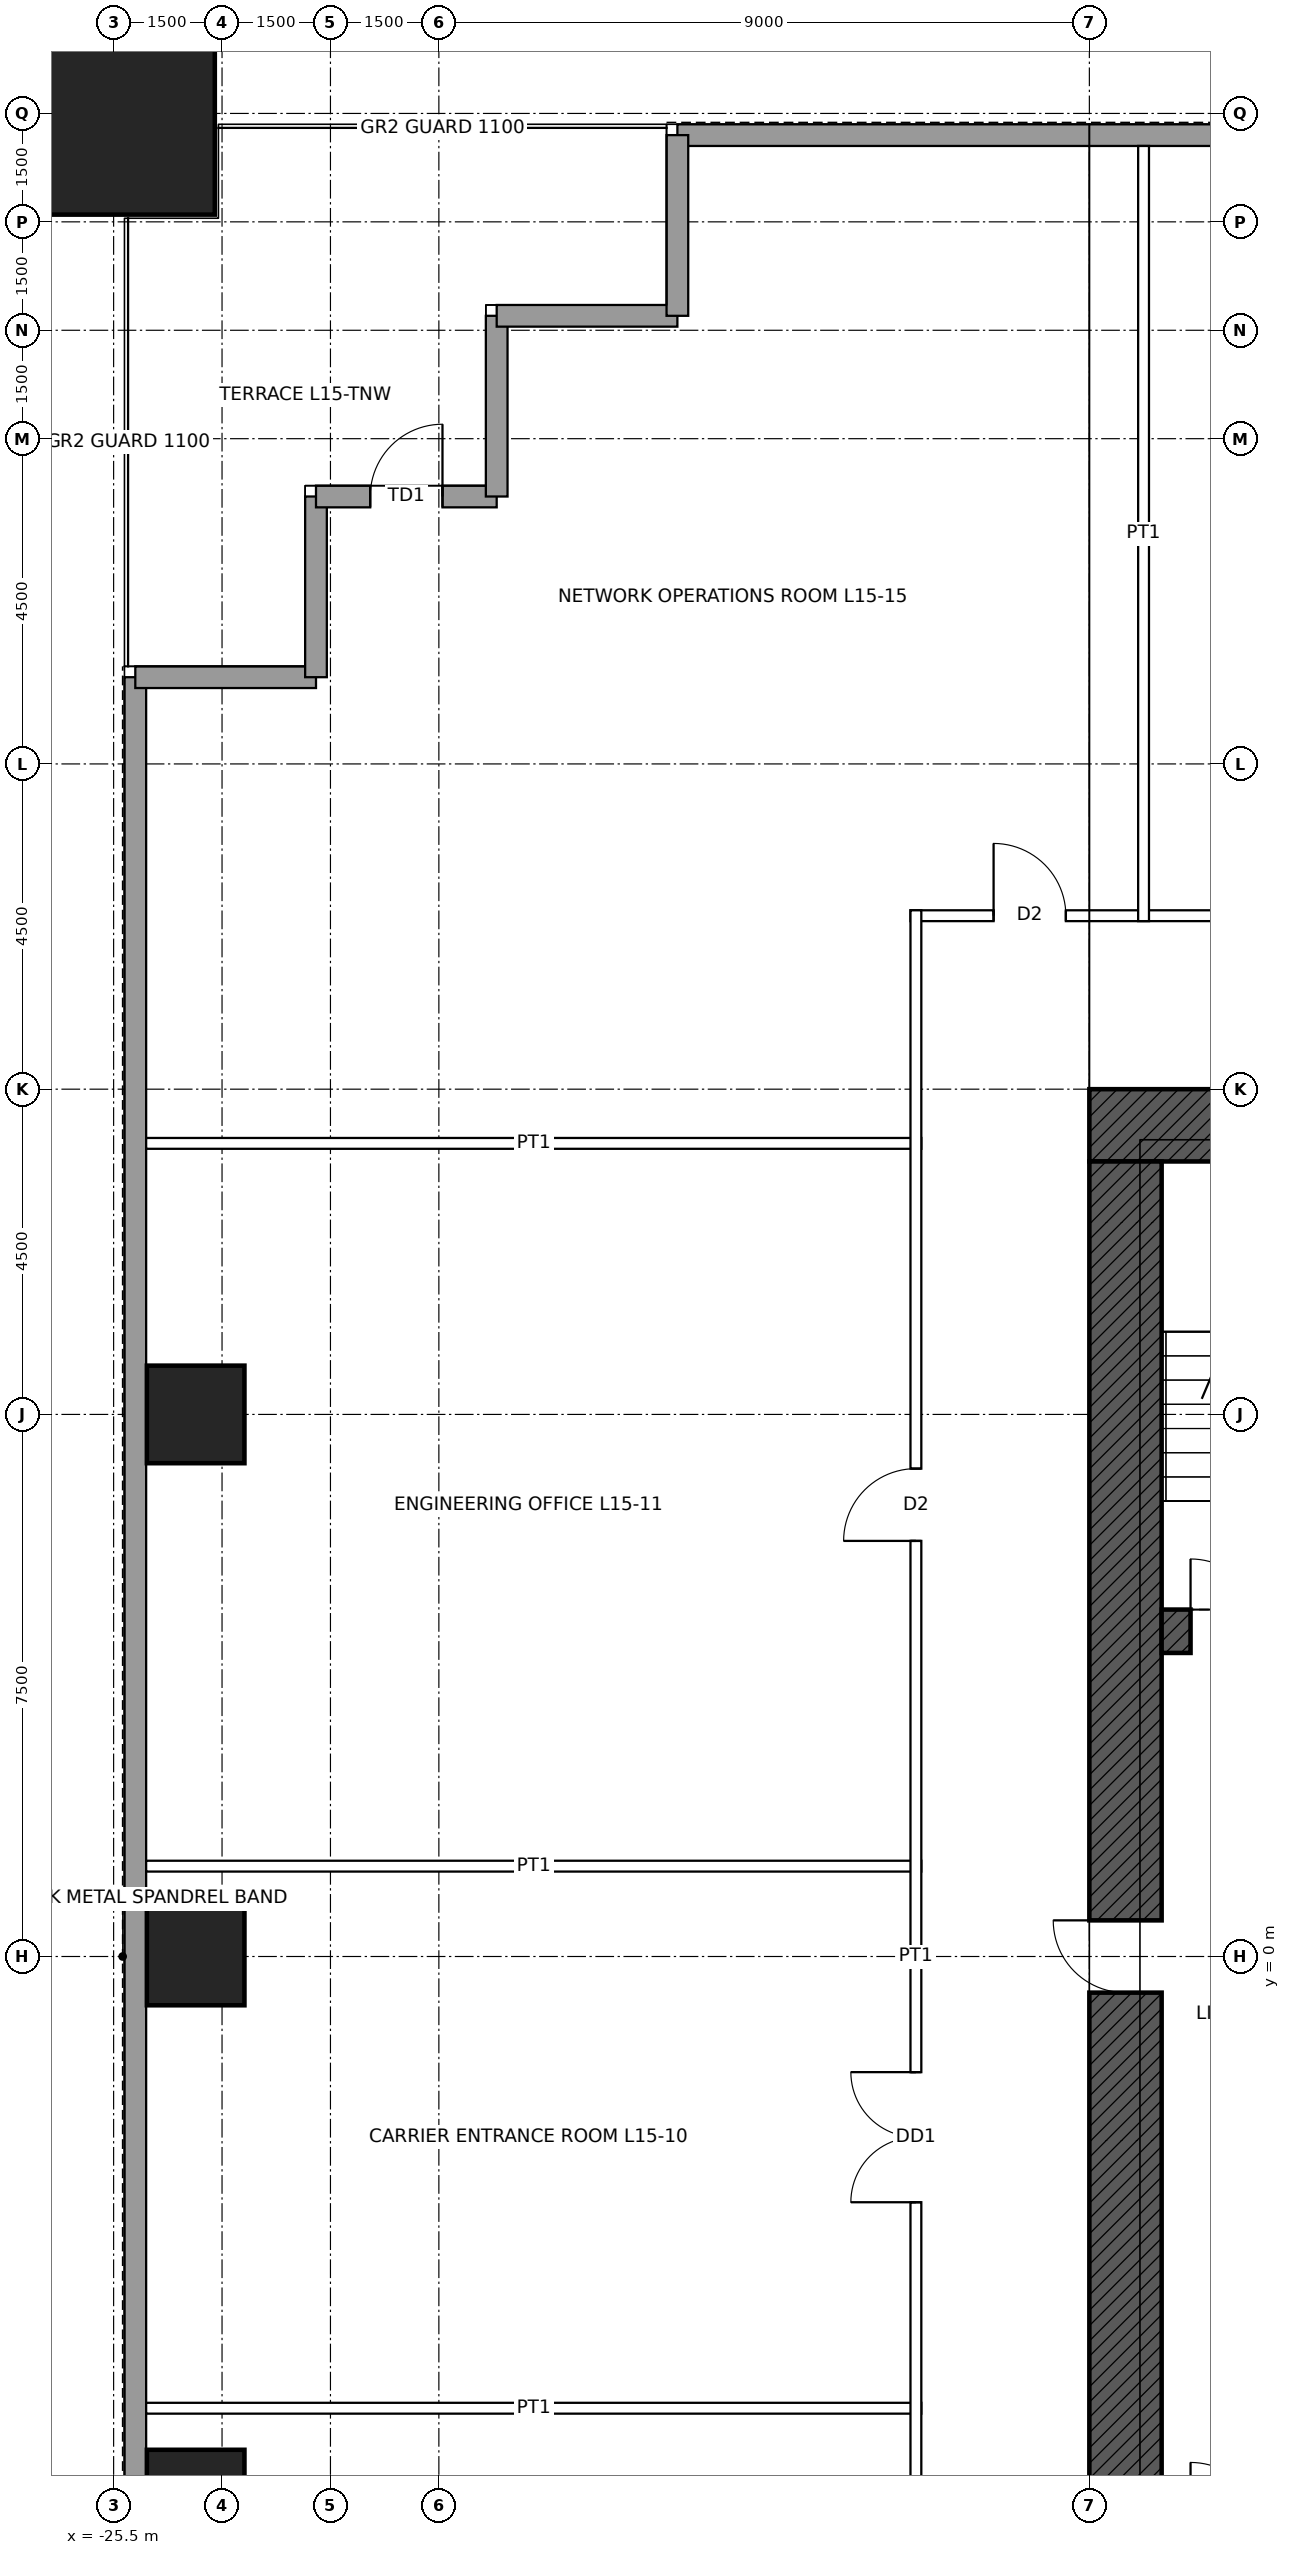
"""IFC4 building model, lengths in metres.
Left out: names, types, materials, properties, quantities, classifications, styles, units other than length and angle.
Written with IfcOpenShell. Run it as: python <this file> out.ifc"""

import sys

from ifc_helpers import new_model, si_unit, direction, frame, frame_2d, origin, origin_2d, place, context, subcontext, project, spatial, rectangle, hollow_rectangle, extrude, element, fill, save


model = new_model("IFC4")
c1 = context("Model", 3, precision=1e-05, world=origin(), true_north=direction((0.0, 1.0)))
c2 = subcontext(c1, "Body", "Model", "MODEL_VIEW")
j1 = project(units=[si_unit("LENGTHUNIT", "METRE"), si_unit("PLANEANGLEUNIT", "RADIAN")], contexts=[c1])
p1 = place(None, origin())
s1 = spatial("IfcSite", under=j1, at=p1, CompositionType="ELEMENT")
p2 = place(p1, origin())
s2 = spatial("IfcBuilding", under=s1, at=p2, CompositionType="ELEMENT")
p3 = place(p2, frame((0.0, 0.0, 78.4)))
s3 = spatial("IfcBuildingStorey", under=s2, at=p3, CompositionType="ELEMENT", Elevation=78.4)
p4 = place(p3, frame((-25.5, 25.5, 0.0), z_axis=(0.0, 0.0, 1.0), x_axis=(1.0, 0.0, 0.0)))
e1 = element("IfcColumn", 1, at=p4, inside=s3, PredefinedType="COLUMN", context=c2, shape_type="SweptSolid", body=[
    extrude(hollow_rectangle(XDim=2.8, YDim=2.8, WallThickness=0.14, at=origin_2d()), origin(), (0.0, 0.0, 1.0), 5.0),
])
for number, where, z_axis, x_axis in (
    (2, (-24.365, -7.5, 0.0), (0.0, 0.0, 1.0), (1.0, 0.0, 0.0)),
    (3, (-24.365, 0.0, 0.0), (0.0, 0.0, 1.0), (1.0, 0.0, 0.0)),
    (4, (-24.365, 7.5, 0.0), (0.0, 0.0, 1.0), (1.0, 0.0, 0.0)),
):
    element("IfcColumn", number, at=place(p3, frame(where, z_axis=z_axis, x_axis=x_axis)), inside=s3, PredefinedType="COLUMN", context=c2, shape_type="SweptSolid", body=[
        extrude(hollow_rectangle(XDim=1.35, YDim=1.35, WallThickness=0.085, at=origin_2d()), origin(), (0.0, 0.0, 1.0), 5.0),
    ])
p5 = place(p3, frame((-12.0, 11.5, 0.0), z_axis=(0.0, 0.0, 1.0), x_axis=(1.0, 0.0, 0.0)))
e5 = element("IfcWall", 5, at=p5, inside=s3, PredefinedType="SHEAR", context=c2, shape_type="SweptSolid", body=[
    extrude(rectangle(XDim=24.0, YDim=1.0, at=frame_2d((12.0, 0.0))), origin(), (0.0, 0.0, 1.0), 5.0),
])
p6 = place(p5, frame((6.25, 0.0, 0.0)))
e6 = element("IfcOpeningElement", 6, at=p6, cuts=e5, PredefinedType="OPENING", context=c2, shape_type="SweptSolid", body=[
    extrude(rectangle(XDim=1.0, YDim=2.4, at=frame_2d((0.5, 1.2))), frame((0.0, 0.51, 0.0), z_axis=(0.0, -1.0, 0.0), x_axis=(1.0, 0.0, 0.0)), (0.0, 0.0, 1.0), 1.02),
])
p7 = place(p5, frame((16.75, 0.0, 0.0)))
e7 = element("IfcOpeningElement", 7, at=p7, cuts=e5, PredefinedType="OPENING", context=c2, shape_type="SweptSolid", body=[
    extrude(rectangle(XDim=1.0, YDim=2.4, at=frame_2d((0.5, 1.2))), frame((0.0, 0.51, 0.0), z_axis=(0.0, -1.0, 0.0), x_axis=(1.0, 0.0, 0.0)), (0.0, 0.0, 1.0), 1.02),
])
p8 = place(p3, frame((-11.5, -11.0, 0.0), z_axis=(0.0, 0.0, 1.0), x_axis=(0.0, 1.0, 0.0)))
e8 = element("IfcWall", 8, at=p8, inside=s3, PredefinedType="SHEAR", context=c2, shape_type="SweptSolid", body=[
    extrude(rectangle(XDim=22.0, YDim=1.0, at=frame_2d((11.0, 0.0))), origin(), (0.0, 0.0, 1.0), 5.0),
])
p9 = place(p8, frame((10.5, 0.0, 0.0)))
e9 = element("IfcOpeningElement", 9, at=p9, cuts=e8, PredefinedType="OPENING", context=c2, shape_type="SweptSolid", body=[
    extrude(rectangle(XDim=1.0, YDim=2.4, at=frame_2d((0.5, 1.2))), frame((0.0, 0.51, 0.0), z_axis=(0.0, -1.0, 0.0), x_axis=(1.0, 0.0, 0.0)), (0.0, 0.0, 1.0), 1.02),
])
p10 = place(p3, frame((-11.0, 4.5, 0.0), z_axis=(0.0, 0.0, 1.0), x_axis=(1.0, 0.0, 0.0)))
e10 = element("IfcWall", 10, at=p10, inside=s3, PredefinedType="SHEAR", context=c2, shape_type="SweptSolid", body=[
    extrude(rectangle(XDim=22.0, YDim=0.6, at=frame_2d((11.0, 0.0))), origin(), (0.0, 0.0, 1.0), 5.0),
])
p11 = place(p10, frame((0.4, 0.0, 0.0)))
e11 = element("IfcOpeningElement", 11, at=p11, cuts=e10, PredefinedType="OPENING", context=c2, shape_type="SweptSolid", body=[
    extrude(rectangle(XDim=1.0, YDim=2.1, at=frame_2d((0.5, 1.05))), frame((0.0, 0.31, 0.0), z_axis=(0.0, -1.0, 0.0), x_axis=(1.0, 0.0, 0.0)), (0.0, 0.0, 1.0), 0.62),
])
p12 = place(p10, frame((20.6, 0.0, 0.0)))
e12 = element("IfcOpeningElement", 12, at=p12, cuts=e10, PredefinedType="OPENING", context=c2, shape_type="SweptSolid", body=[
    extrude(rectangle(XDim=1.0, YDim=2.1, at=frame_2d((0.5, 1.05))), frame((0.0, 0.31, 0.0), z_axis=(0.0, -1.0, 0.0), x_axis=(1.0, 0.0, 0.0)), (0.0, 0.0, 1.0), 0.62),
])
for number, where, z_axis, x_axis in (
    (13, (-17.7, 25.2, 0.0), (0.0, 0.0, 1.0), (1.0, 0.0, 0.0)),
    (14, (-25.2, -17.7, 0.0), (0.0, 0.0, 1.0), (0.0, 1.0, 0.0)),
):
    element("IfcWall", number, at=place(p3, frame(where, z_axis=z_axis, x_axis=x_axis)), inside=s3, PredefinedType="SOLIDWALL", context=c2, shape_type="SweptSolid", body=[
        extrude(rectangle(XDim=35.4, YDim=0.3, at=frame_2d((17.7, 0.0))), origin(), (0.0, 0.0, 1.0), 4.8),
    ])
for number, where, z_axis, x_axis in (
    (15, (-25.2, 17.7, 0.0), (0.0, 0.0, 1.0), (1.0, 0.0, 0.0)),
    (16, (-22.7, 17.7, 0.0), (0.0, 0.0, 1.0), (0.0, 1.0, 0.0)),
):
    element("IfcWall", number, at=place(p3, frame(where, z_axis=z_axis, x_axis=x_axis)), inside=s3, PredefinedType="SOLIDWALL", context=c2, shape_type="SweptSolid", body=[
        extrude(rectangle(XDim=2.5, YDim=0.3, at=frame_2d((1.25, 0.0))), origin(), (0.0, 0.0, 1.0), 4.8),
    ])
p13 = place(p3, frame((-22.7, 20.2, 0.0), z_axis=(0.0, 0.0, 1.0), x_axis=(1.0, 0.0, 0.0)))
e17 = element("IfcWall", 17, at=p13, inside=s3, PredefinedType="SOLIDWALL", context=c2, shape_type="SweptSolid", body=[
    extrude(rectangle(XDim=2.5, YDim=0.3, at=frame_2d((1.25, 0.0))), origin(), (0.0, 0.0, 1.0), 4.8),
])
p14 = place(p13, frame((0.75, 0.0, 0.0)))
e18 = element("IfcOpeningElement", 18, at=p14, cuts=e17, PredefinedType="OPENING", context=c2, shape_type="SweptSolid", body=[
    extrude(rectangle(XDim=1.0, YDim=2.4, at=frame_2d((0.5, 1.2))), frame((0.0, 0.16, 0.0), z_axis=(0.0, -1.0, 0.0), x_axis=(1.0, 0.0, 0.0)), (0.0, 0.0, 1.0), 0.32),
])
for number, where, z_axis, x_axis in (
    (19, (-20.2, 20.2, 0.0), (0.0, 0.0, 1.0), (0.0, 1.0, 0.0)),
    (20, (-20.2, 22.7, 0.0), (0.0, 0.0, 1.0), (1.0, 0.0, 0.0)),
    (21, (-17.7, 22.7, 0.0), (0.0, 0.0, 1.0), (0.0, 1.0, 0.0)),
):
    element("IfcWall", number, at=place(p3, frame(where, z_axis=z_axis, x_axis=x_axis)), inside=s3, PredefinedType="SOLIDWALL", context=c2, shape_type="SweptSolid", body=[
        extrude(rectangle(XDim=2.5, YDim=0.3, at=frame_2d((1.25, 0.0))), origin(), (0.0, 0.0, 1.0), 4.8),
    ])
for number, where, z_axis, x_axis in (
    (22, (-25.05, -6.25, 0.0), (0.0, 0.0, 1.0), (1.0, 0.0, 0.0)),
    (23, (-25.05, 1.25, 0.0), (0.0, 0.0, 1.0), (1.0, 0.0, 0.0)),
):
    element("IfcWall", number, at=place(p3, frame(where, z_axis=z_axis, x_axis=x_axis)), inside=s3, PredefinedType="PARTITIONING", context=c2, shape_type="SweptSolid", body=[
        extrude(rectangle(XDim=10.725, YDim=0.15, at=frame_2d((5.363, 0.0))), origin(), (0.0, 0.0, 1.0), 4.8),
    ])
p15 = place(p3, frame((-25.05, 11.25, 0.0), z_axis=(0.0, 0.0, 1.0), x_axis=(1.0, 0.0, 0.0)))
e24 = element("IfcWall", 24, at=p15, inside=s3, PredefinedType="PARTITIONING", context=c2, shape_type="SweptSolid", body=[
    extrude(rectangle(XDim=10.725, YDim=0.15, at=frame_2d((5.363, 0.0))), origin(), (0.0, 0.0, 1.0), 3.853),
])
p16 = place(p3, frame((-14.475, 14.4, 0.0), z_axis=(0.0, 0.0, 1.0), x_axis=(1.0, 0.0, 0.0)))
e25 = element("IfcWall", 25, at=p16, inside=s3, PredefinedType="PARTITIONING", context=c2, shape_type="SweptSolid", body=[
    extrude(rectangle(XDim=28.95, YDim=0.15, at=frame_2d((14.475, 0.0))), origin(), (0.0, 0.0, 1.0), 4.8),
])
p17 = place(p16, frame((4.825, 0.0, 0.0)))
e26 = element("IfcOpeningElement", 26, at=p17, cuts=e25, PredefinedType="OPENING", context=c2, shape_type="SweptSolid", body=[
    extrude(rectangle(XDim=1.8, YDim=2.4, at=frame_2d((0.9, 1.2))), frame((0.0, 0.085, 0.0), z_axis=(0.0, -1.0, 0.0), x_axis=(1.0, 0.0, 0.0)), (0.0, 0.0, 1.0), 0.17),
])
p18 = place(p16, frame((13.575, 0.0, 0.0)))
e27 = element("IfcOpeningElement", 27, at=p18, cuts=e25, PredefinedType="OPENING", context=c2, shape_type="SweptSolid", body=[
    extrude(rectangle(XDim=1.8, YDim=2.4, at=frame_2d((0.9, 1.2))), frame((0.0, 0.085, 0.0), z_axis=(0.0, -1.0, 0.0), x_axis=(1.0, 0.0, 0.0)), (0.0, 0.0, 1.0), 0.17),
])
p19 = place(p16, frame((22.725, 0.0, 0.0)))
e28 = element("IfcOpeningElement", 28, at=p19, cuts=e25, PredefinedType="OPENING", context=c2, shape_type="SweptSolid", body=[
    extrude(rectangle(XDim=1.0, YDim=2.1, at=frame_2d((0.5, 1.05))), frame((0.0, 0.085, 0.0), z_axis=(0.0, -1.0, 0.0), x_axis=(1.0, 0.0, 0.0)), (0.0, 0.0, 1.0), 0.17),
])
p20 = place(p16, frame((26.8, 0.0, 0.0)))
e29 = element("IfcOpeningElement", 29, at=p20, cuts=e25, PredefinedType="OPENING", context=c2, shape_type="SweptSolid", body=[
    extrude(rectangle(XDim=1.0, YDim=2.1, at=frame_2d((0.5, 1.05))), frame((0.0, 0.085, 0.0), z_axis=(0.0, -1.0, 0.0), x_axis=(1.0, 0.0, 0.0)), (0.0, 0.0, 1.0), 0.17),
])
p21 = place(p16, frame((1.15, 0.0, 0.0)))
e30 = element("IfcOpeningElement", 30, at=p21, cuts=e25, PredefinedType="OPENING", context=c2, shape_type="SweptSolid", body=[
    extrude(rectangle(XDim=1.0, YDim=2.1, at=frame_2d((0.5, 1.05))), frame((0.0, 0.085, 0.0), z_axis=(0.0, -1.0, 0.0), x_axis=(1.0, 0.0, 0.0)), (0.0, 0.0, 1.0), 0.17),
])
p22 = place(p3, frame((-14.4, -14.475, 0.0), z_axis=(0.0, 0.0, 1.0), x_axis=(0.0, 1.0, 0.0)))
e31 = element("IfcWall", 31, at=p22, inside=s3, PredefinedType="PARTITIONING", context=c2, shape_type="SweptSolid", body=[
    extrude(rectangle(XDim=28.95, YDim=0.15, at=frame_2d((14.475, 0.0))), origin(), (0.0, 0.0, 1.0), 4.8),
])
p23 = place(p22, frame((4.825, 0.0, 0.0)))
e32 = element("IfcOpeningElement", 32, at=p23, cuts=e31, PredefinedType="OPENING", context=c2, shape_type="SweptSolid", body=[
    extrude(rectangle(XDim=1.8, YDim=2.4, at=frame_2d((0.9, 1.2))), frame((0.0, 0.085, 0.0), z_axis=(0.0, -1.0, 0.0), x_axis=(1.0, 0.0, 0.0)), (0.0, 0.0, 1.0), 0.17),
])
p24 = place(p22, frame((11.075, 0.0, 0.0)))
e33 = element("IfcOpeningElement", 33, at=p24, cuts=e31, PredefinedType="OPENING", context=c2, shape_type="SweptSolid", body=[
    extrude(rectangle(XDim=1.8, YDim=2.4, at=frame_2d((0.9, 1.2))), frame((0.0, 0.085, 0.0), z_axis=(0.0, -1.0, 0.0), x_axis=(1.0, 0.0, 0.0)), (0.0, 0.0, 1.0), 0.17),
])
p25 = place(p22, frame((20.225, 0.0, 0.0)))
e34 = element("IfcOpeningElement", 34, at=p25, cuts=e31, PredefinedType="OPENING", context=c2, shape_type="SweptSolid", body=[
    extrude(rectangle(XDim=1.0, YDim=2.1, at=frame_2d((0.5, 1.05))), frame((0.0, 0.085, 0.0), z_axis=(0.0, -1.0, 0.0), x_axis=(1.0, 0.0, 0.0)), (0.0, 0.0, 1.0), 0.17),
])
p26 = place(p3, frame((-11.25, 14.325, 0.0), z_axis=(0.0, 0.0, 1.0), x_axis=(0.0, 1.0, 0.0)))
e35 = element("IfcWall", 35, at=p26, inside=s3, PredefinedType="PARTITIONING", context=c2, shape_type="SweptSolid", body=[
    extrude(rectangle(XDim=10.725, YDim=0.15, at=frame_2d((5.363, 0.0))), origin(), (0.0, 0.0, 1.0), 3.853),
])
p27 = place(p14, origin())
e36 = element("IfcDoor", 36, at=p27, inside=s3, OperationType="SINGLE_SWING_RIGHT", PredefinedType="DOOR", context=c2, shape_type="SweptSolid", body=[
    extrude(rectangle(XDim=1.0, YDim=2.4, at=frame_2d((0.5, 1.2))), frame((0.0, 0.025, 0.0), z_axis=(0.0, -1.0, 0.0), x_axis=(1.0, 0.0, 0.0)), (0.0, 0.0, 1.0), 0.05),
])
fill(e18, e36)
p28 = place(p11, origin())
e37 = element("IfcDoor", 37, at=p28, inside=s3, OperationType="SINGLE_SWING_LEFT", PredefinedType="DOOR", context=c2, shape_type="SweptSolid", body=[
    extrude(rectangle(XDim=1.0, YDim=2.1, at=frame_2d((0.5, 1.05))), frame((0.0, 0.025, 0.0), z_axis=(0.0, -1.0, 0.0), x_axis=(1.0, 0.0, 0.0)), (0.0, 0.0, 1.0), 0.05),
])
fill(e11, e37)
p29 = place(p9, origin())
e38 = element("IfcDoor", 38, at=p29, inside=s3, OperationType="SINGLE_SWING_RIGHT", PredefinedType="DOOR", context=c2, shape_type="SweptSolid", body=[
    extrude(rectangle(XDim=1.0, YDim=2.4, at=frame_2d((0.5, 1.2))), frame((0.0, 0.485, 0.0), z_axis=(0.0, -1.0, 0.0), x_axis=(1.0, 0.0, 0.0)), (0.0, 0.0, 1.0), 0.05),
])
fill(e9, e38)
p30 = place(p24, origin())
e39 = element("IfcDoor", 39, at=p30, inside=s3, OperationType="DOUBLE_DOOR_SINGLE_SWING", PredefinedType="DOOR", context=c2, shape_type="SweptSolid", body=[
    extrude(rectangle(XDim=1.8, YDim=2.4, at=frame_2d((0.9, 1.2))), frame((0.0, 0.025, 0.0), z_axis=(0.0, -1.0, 0.0), x_axis=(1.0, 0.0, 0.0)), (0.0, 0.0, 1.0), 0.05),
])
fill(e33, e39)
p31 = place(p25, origin())
e40 = element("IfcDoor", 40, at=p31, inside=s3, OperationType="SINGLE_SWING_LEFT", PredefinedType="DOOR", context=c2, shape_type="SweptSolid", body=[
    extrude(rectangle(XDim=1.0, YDim=2.1, at=frame_2d((0.5, 1.05))), frame((0.0, 0.025, 0.0), z_axis=(0.0, -1.0, 0.0), x_axis=(1.0, 0.0, 0.0)), (0.0, 0.0, 1.0), 0.05),
])
fill(e34, e40)
p32 = place(p21, origin())
e41 = element("IfcDoor", 41, at=p32, inside=s3, OperationType="SINGLE_SWING_LEFT", PredefinedType="DOOR", context=c2, shape_type="SweptSolid", body=[
    extrude(rectangle(XDim=1.0, YDim=2.1, at=frame_2d((0.5, 1.05))), frame((0.0, 0.025, 0.0), z_axis=(0.0, -1.0, 0.0), x_axis=(1.0, 0.0, 0.0)), (0.0, 0.0, 1.0), 0.05),
])
fill(e30, e41)
save(model, sys.argv[1])
